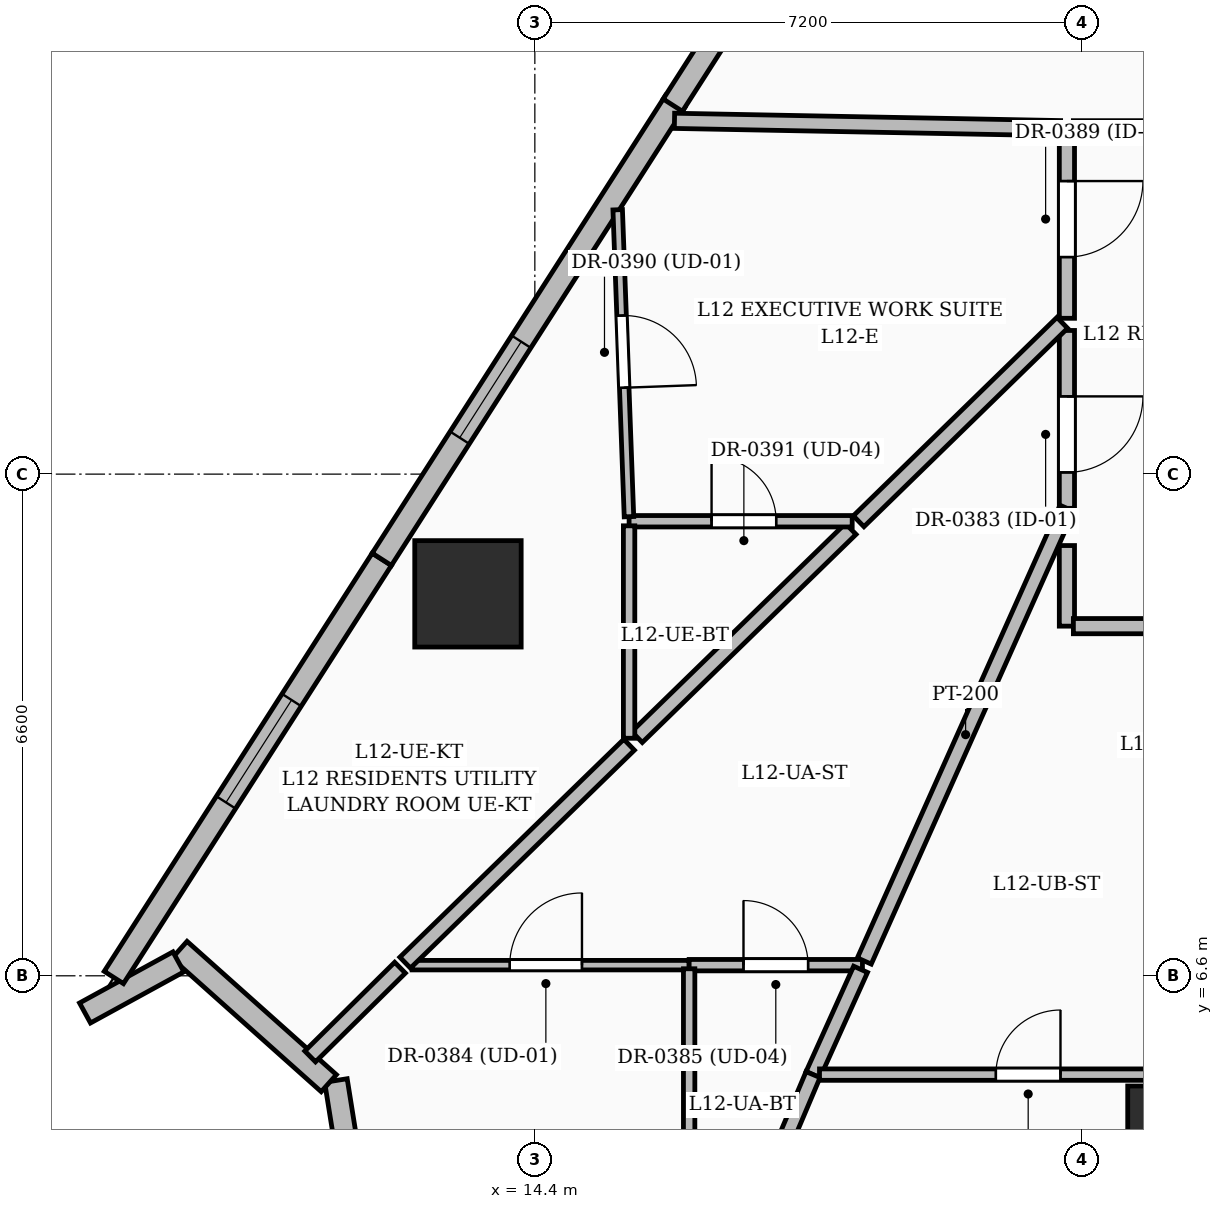
"""IFC4 building model, lengths in metres.
Left out: names, types, materials, properties, quantities, classifications, styles, units other than length and angle.
Written with IfcOpenShell. Run it as: python <this file> out.ifc"""

import sys

from ifc_helpers import new_model, si_unit, direction, frame, frame_2d, origin, origin_2d, place, context, subcontext, project, spatial, rectangle, extrude, element, fill, save


model = new_model("IFC4")
c1 = context("Model", 3, precision=1e-05, world=origin(), true_north=direction((0.0, 1.0)))
c2 = subcontext(c1, "Body", "Model", "MODEL_VIEW")
j1 = project(units=[si_unit("LENGTHUNIT", "METRE"), si_unit("PLANEANGLEUNIT", "RADIAN")], contexts=[c1])
p1 = place(None, origin())
s1 = spatial("IfcSite", under=j1, at=p1, CompositionType="ELEMENT")
p2 = place(p1, origin())
s2 = spatial("IfcBuilding", under=s1, at=p2, CompositionType="ELEMENT")
p3 = place(p2, frame((0.0, 0.0, 53.4)))
s3 = spatial("IfcBuildingStorey", under=s2, at=p3, CompositionType="ELEMENT", Elevation=53.4)
p4 = place(p3, frame((22.8, 4.55, 0.0), z_axis=(0.0, 0.0, 1.0), x_axis=(1.0, 0.0, 0.0)))
e1 = element("IfcColumn", 1, at=p4, inside=s3, PredefinedType="COLUMN", context=c2, shape_type="SweptSolid", body=[
    extrude(rectangle(XDim=1.2, YDim=1.2, at=origin_2d()), origin(), (0.0, 0.0, 1.0), 3.6),
])
p5 = place(p3, frame((13.52, 11.625, 0.0), z_axis=(0.0, 0.0, 1.0), x_axis=(1.0, 0.0, 0.0)))
e2 = element("IfcColumn", 2, at=p5, inside=s3, PredefinedType="COLUMN", context=c2, shape_type="SweptSolid", body=[
    extrude(rectangle(XDim=1.4, YDim=1.4, at=origin_2d()), origin(), (0.0, 0.0, 1.0), 3.6),
])
p6 = place(p3, frame((12.203, 2.602, 0.0), z_axis=(0.0, 0.0, 1.0), x_axis=(-0.158173523246, 0.987411330978, 0.0)))
e3 = element("IfcWall", 3, at=p6, inside=s3, PredefinedType="SOLIDWALL", context=c2, shape_type="SweptSolid", body=[
    extrude(rectangle(XDim=2.653, YDim=0.3, at=frame_2d((1.327, 0.0))), origin(), (0.0, 0.0, 1.0), 3.35),
])
p7 = place(p6, frame((0.325, 0.0, 0.55)))
e4 = element("IfcOpeningElement", 4, at=p7, cuts=e3, PredefinedType="OPENING", context=c2, shape_type="SweptSolid", body=[
    extrude(rectangle(XDim=1.6, YDim=2.2, at=frame_2d((0.8, 1.1))), frame((0.0, 0.16, 0.0), z_axis=(0.0, -1.0, 0.0), x_axis=(1.0, 0.0, 0.0)), (0.0, 0.0, 1.0), 0.32),
])
p8 = place(p3, frame((11.689, 5.187, 0.0), z_axis=(0.0, 0.0, 1.0), x_axis=(-0.745975491387, 0.665973397555, 0.0)))
e5 = element("IfcWall", 5, at=p8, inside=s3, PredefinedType="SOLIDWALL", context=c2, shape_type="SweptSolid", body=[
    extrude(rectangle(XDim=2.634, YDim=0.3, at=frame_2d((1.317, 0.0))), origin(), (0.0, 0.0, 1.0), 3.35),
])
p9 = place(p3, frame((9.711, 6.783, 0.0), z_axis=(0.0, 0.0, 1.0), x_axis=(-0.877215145436, -0.480097478245, 0.0)))
e6 = element("IfcWall", 6, at=p9, inside=s3, PredefinedType="SOLIDWALL", context=c2, shape_type="SweptSolid", body=[
    extrude(rectangle(XDim=1.4, YDim=0.3, at=frame_2d((0.7, 0.0))), origin(), (0.0, 0.0, 1.0), 3.35),
])
p10 = place(p3, frame((8.861, 6.578, 0.0), z_axis=(0.0, 0.0, 1.0), x_axis=(0.539510604495, 0.841978804744, 0.0)))
e7 = element("IfcWall", 7, at=p10, inside=s3, PredefinedType="SOLIDWALL", context=c2, shape_type="SweptSolid", body=[
    extrude(rectangle(XDim=6.534, YDim=0.3, at=frame_2d((3.267, 0.0))), origin(), (0.0, 0.0, 1.0), 3.35),
])
p11 = place(p10, frame((2.735, 0.0, 0.55)))
e8 = element("IfcOpeningElement", 8, at=p11, cuts=e7, PredefinedType="OPENING", context=c2, shape_type="SweptSolid", body=[
    extrude(rectangle(XDim=1.6, YDim=2.2, at=frame_2d((0.8, 1.1))), frame((0.0, 0.16, 0.0), z_axis=(0.0, -1.0, 0.0), x_axis=(1.0, 0.0, 0.0)), (0.0, 0.0, 1.0), 0.32),
])
p12 = place(p3, frame((12.386, 12.079, 0.0), z_axis=(0.0, 0.0, 1.0), x_axis=(0.539509086386, 0.841979777493, 0.0)))
e9 = element("IfcWall", 9, at=p12, inside=s3, PredefinedType="SOLIDWALL", context=c2, shape_type="SweptSolid", body=[
    extrude(rectangle(XDim=7.149, YDim=0.3, at=frame_2d((3.574, 0.0))), origin(), (0.0, 0.0, 1.0), 3.35),
])
p13 = place(p12, frame((1.9, 0.0, 0.6)))
e10 = element("IfcOpeningElement", 10, at=p13, cuts=e9, PredefinedType="OPENING", context=c2, shape_type="SweptSolid", body=[
    extrude(rectangle(XDim=1.5, YDim=2.1, at=frame_2d((0.75, 1.05))), frame((0.0, 0.16, 0.0), z_axis=(0.0, -1.0, 0.0), x_axis=(1.0, 0.0, 0.0)), (0.0, 0.0, 1.0), 0.32),
])
p14 = place(p3, frame((16.215, 18.054, 0.0), z_axis=(0.0, 0.0, 1.0), x_axis=(0.539527015547, 0.841968288889, 0.0)))
e11 = element("IfcWall", 11, at=p14, inside=s3, PredefinedType="SOLIDWALL", context=c2, shape_type="SweptSolid", body=[
    extrude(rectangle(XDim=6.922, YDim=0.3, at=frame_2d((3.461, 0.0))), origin(), (0.0, 0.0, 1.0), 3.35),
])
p15 = place(p14, frame((2.978, 0.0, 0.8)))
e12 = element("IfcOpeningElement", 12, at=p15, cuts=e11, PredefinedType="OPENING", context=c2, shape_type="SweptSolid", body=[
    extrude(rectangle(XDim=1.2, YDim=1.8, at=frame_2d((0.6, 0.9))), frame((0.0, 0.16, 0.0), z_axis=(0.0, -1.0, 0.0), x_axis=(1.0, 0.0, 0.0)), (0.0, 0.0, 1.0), 0.32),
])
p16 = place(p3, frame((21.4, 15.09, 0.0), z_axis=(0.0, 0.0, 1.0), x_axis=(0.0, -1.0, 0.0)))
e13 = element("IfcWall", 13, at=p16, inside=s3, PredefinedType="PARTITIONING", context=c2, shape_type="SweptSolid", body=[
    extrude(rectangle(XDim=2.34, YDim=0.2, at=frame_2d((1.17, 0.0))), origin(), (0.0, 0.0, 1.0), 3.01),
])
p17 = place(p16, frame((0.867, 0.0, 0.0)))
e14 = element("IfcOpeningElement", 14, at=p17, cuts=e13, PredefinedType="OPENING", context=c2, shape_type="SweptSolid", body=[
    extrude(rectangle(XDim=1.0, YDim=2.2, at=frame_2d((0.5, 1.1))), frame((0.0, 0.11, 0.0), z_axis=(0.0, -1.0, 0.0), x_axis=(1.0, 0.0, 0.0)), (0.0, 0.0, 1.0), 0.22),
])
p18 = place(p3, frame((21.4, 12.26, 0.0), z_axis=(0.0, 0.0, 1.0), x_axis=(0.0, -1.0, 0.0)))
e15 = element("IfcWall", 15, at=p18, inside=s3, PredefinedType="PARTITIONING", context=c2, shape_type="SweptSolid", body=[
    extrude(rectangle(XDim=1.061, YDim=0.2, at=frame_2d((0.53, 0.0))), origin(), (0.0, 0.0, 1.0), 3.35),
])
p19 = place(p3, frame((21.485, 11.2, 0.0), z_axis=(0.0, 0.0, 1.0), x_axis=(1.0, 0.0, 0.0)))
e16 = element("IfcWall", 16, at=p19, inside=s3, PredefinedType="PARTITIONING", context=c2, shape_type="SweptSolid", body=[
    extrude(rectangle(XDim=3.384, YDim=0.2, at=frame_2d((1.692, 0.0))), origin(), (0.0, 0.0, 1.0), 3.01),
])
p20 = place(p19, frame((1.25, 0.0, 0.0)))
e17 = element("IfcOpeningElement", 17, at=p20, cuts=e16, PredefinedType="OPENING", context=c2, shape_type="SweptSolid", body=[
    extrude(rectangle(XDim=1.0, YDim=2.2, at=frame_2d((0.5, 1.1))), frame((0.0, 0.11, 0.0), z_axis=(0.0, -1.0, 0.0), x_axis=(1.0, 0.0, 0.0)), (0.0, 0.0, 1.0), 0.22),
])
p21 = place(p3, frame((21.4, 17.75, 0.0), z_axis=(0.0, 0.0, 1.0), x_axis=(0.0, -1.0, 0.0)))
e18 = element("IfcWall", 18, at=p21, inside=s3, PredefinedType="PARTITIONING", context=c2, shape_type="SweptSolid", body=[
    extrude(rectangle(XDim=2.5, YDim=0.2, at=frame_2d((1.25, 0.0))), origin(), (0.0, 0.0, 1.0), 3.35),
])
p22 = place(p21, frame((0.695, 0.0, 0.0)))
e19 = element("IfcOpeningElement", 19, at=p22, cuts=e18, PredefinedType="OPENING", context=c2, shape_type="SweptSolid", body=[
    extrude(rectangle(XDim=1.0, YDim=2.2, at=frame_2d((0.5, 1.1))), frame((0.0, 0.11, 0.0), z_axis=(0.0, -1.0, 0.0), x_axis=(1.0, 0.0, 0.0)), (0.0, 0.0, 1.0), 0.22),
])
p23 = place(p3, frame((27.43, 17.75, 0.0), z_axis=(0.0, 0.0, 1.0), x_axis=(-1.0, 0.0, 0.0)))
e20 = element("IfcWall", 20, at=p23, inside=s3, PredefinedType="PARTITIONING", context=c2, shape_type="SweptSolid", body=[
    extrude(rectangle(XDim=5.945, YDim=0.2, at=frame_2d((2.972, 0.0))), origin(), (0.0, 0.0, 1.0), 2.279),
])
p24 = place(p23, frame((2.506, 0.0, 0.0)))
e21 = element("IfcOpeningElement", 21, at=p24, cuts=e20, PredefinedType="OPENING", context=c2, shape_type="SweptSolid", body=[
    extrude(rectangle(XDim=0.9, YDim=2.1, at=frame_2d((0.45, 1.05))), frame((0.0, 0.11, 0.0), z_axis=(0.0, -1.0, 0.0), x_axis=(1.0, 0.0, 0.0)), (0.0, 0.0, 1.0), 0.22),
])
p25 = place(p3, frame((12.785, 6.74, 0.0), z_axis=(0.0, 0.0, 1.0), x_axis=(1.0, 0.0, 0.0)))
e22 = element("IfcWall", 22, at=p25, inside=s3, PredefinedType="PARTITIONING", context=c2, shape_type="SweptSolid", body=[
    extrude(rectangle(XDim=3.645, YDim=0.125, at=frame_2d((1.823, 0.0))), origin(), (0.0, 0.0, 1.0), 2.37),
])
p26 = place(p25, frame((1.285, 0.0, 0.0)))
e23 = element("IfcOpeningElement", 23, at=p26, cuts=e22, PredefinedType="OPENING", context=c2, shape_type="SweptSolid", body=[
    extrude(rectangle(XDim=0.95, YDim=2.2, at=frame_2d((0.475, 1.1))), frame((0.0, 0.072, 0.0), z_axis=(0.0, -1.0, 0.0), x_axis=(1.0, 0.0, 0.0)), (0.0, 0.0, 1.0), 0.145),
])
p27 = place(p3, frame((16.43, 6.74, 0.0), z_axis=(0.0, 0.0, 1.0), x_axis=(1.0, 0.0, 0.0)))
e24 = element("IfcWall", 24, at=p27, inside=s3, PredefinedType="PARTITIONING", context=c2, shape_type="SweptSolid", body=[
    extrude(rectangle(XDim=2.28, YDim=0.15, at=frame_2d((1.14, 0.0))), origin(), (0.0, 0.0, 1.0), 2.37),
])
p28 = place(p27, frame((0.715, 0.0, 0.0)))
e25 = element("IfcOpeningElement", 25, at=p28, cuts=e24, PredefinedType="OPENING", context=c2, shape_type="SweptSolid", body=[
    extrude(rectangle(XDim=0.85, YDim=2.1, at=frame_2d((0.425, 1.05))), frame((0.0, 0.085, 0.0), z_axis=(0.0, -1.0, 0.0), x_axis=(1.0, 0.0, 0.0)), (0.0, 0.0, 1.0), 0.17),
])
p29 = place(p3, frame((18.735, 6.795, 0.0), z_axis=(0.0, 0.0, 1.0), x_axis=(0.408515389568, 0.912751431928, 0.0)))
e26 = element("IfcWall", 26, at=p29, inside=s3, PredefinedType="PARTITIONING", context=c2, shape_type="SweptSolid", body=[
    extrude(rectangle(XDim=6.524, YDim=0.2, at=frame_2d((3.262, 0.0))), origin(), (0.0, 0.0, 1.0), 2.279),
])
p30 = place(p3, frame((21.339, 15.191, 0.0), z_axis=(0.0, 0.0, 1.0), x_axis=(-0.716217041319, -0.697877603684, 0.0)))
e27 = element("IfcWall", 27, at=p30, inside=s3, PredefinedType="PARTITIONING", context=c2, shape_type="SweptSolid", body=[
    extrude(rectangle(XDim=3.741, YDim=0.2, at=frame_2d((1.87, 0.0))), origin(), (0.0, 0.0, 1.0), 3.35),
])
p31 = place(p3, frame((18.556, 12.479, 0.0), z_axis=(0.0, 0.0, 1.0), x_axis=(-0.716529276708, -0.69755701962, 0.0)))
e28 = element("IfcWall", 28, at=p31, inside=s3, PredefinedType="PARTITIONING", context=c2, shape_type="SweptSolid", body=[
    extrude(rectangle(XDim=3.925, YDim=0.2, at=frame_2d((1.962, 0.0))), origin(), (0.0, 0.0, 1.0), 2.279),
])
p32 = place(p3, frame((15.64, 9.64, 0.0), z_axis=(0.0, 0.0, 1.0), x_axis=(-0.716663345688, -0.697419277728, 0.0)))
e29 = element("IfcWall", 29, at=p32, inside=s3, PredefinedType="PARTITIONING", context=c2, shape_type="SweptSolid", body=[
    extrude(rectangle(XDim=4.11, YDim=0.2, at=frame_2d((2.055, 0.0))), origin(), (0.0, 0.0, 1.0), 2.37),
])
p33 = place(p3, frame((16.43, 1.9, 0.0), z_axis=(0.0, 0.0, 1.0), x_axis=(0.0, 1.0, 0.0)))
e30 = element("IfcWall", 30, at=p33, inside=s3, PredefinedType="PARTITIONING", context=c2, shape_type="SweptSolid", body=[
    extrude(rectangle(XDim=4.792, YDim=0.15, at=frame_2d((2.396, 0.0))), origin(), (0.0, 0.0, 1.0), 2.37),
])
p34 = place(p3, frame((12.626, 6.707, 0.0), z_axis=(0.0, 0.0, 1.0), x_axis=(-0.711501350424, -0.702684728982, 0.0)))
e31 = element("IfcWall", 31, at=p34, inside=s3, PredefinedType="PARTITIONING", context=c2, shape_type="SweptSolid", body=[
    extrude(rectangle(XDim=1.661, YDim=0.2, at=frame_2d((0.831, 0.0))), origin(), (0.0, 0.0, 1.0), 3.35),
])
p35 = place(p3, frame((18.06, 5.3, 0.0), z_axis=(0.0, 0.0, 1.0), x_axis=(0.411393031605, 0.911458048155, 0.0)))
e32 = element("IfcWall", 32, at=p35, inside=s3, PredefinedType="PARTITIONING", context=c2, shape_type="SweptSolid", body=[
    extrude(rectangle(XDim=1.52, YDim=0.2, at=frame_2d((0.76, 0.0))), origin(), (0.0, 0.0, 1.0), 3.01),
])
p36 = place(p3, frame((16.627, 1.918, 0.0), z_axis=(0.0, 0.0, 1.0), x_axis=(0.390153809481, 0.920749697229, 0.0)))
e33 = element("IfcWall", 33, at=p36, inside=s3, PredefinedType="PARTITIONING", context=c2, shape_type="SweptSolid", body=[
    extrude(rectangle(XDim=3.673, YDim=0.2, at=frame_2d((1.836, 0.0))), origin(), (0.0, 0.0, 1.0), 2.37),
])
p37 = place(p3, frame((18.145, 5.3, 0.0), z_axis=(0.0, 0.0, 1.0), x_axis=(1.0, 0.0, 0.0)))
e34 = element("IfcWall", 34, at=p37, inside=s3, PredefinedType="PARTITIONING", context=c2, shape_type="SweptSolid", body=[
    extrude(rectangle(XDim=5.695, YDim=0.15, at=frame_2d((2.848, 0.0))), origin(), (0.0, 0.0, 1.0), 3.01),
])
p38 = place(p37, frame((2.32, 0.0, 0.0)))
e35 = element("IfcOpeningElement", 35, at=p38, cuts=e34, PredefinedType="OPENING", context=c2, shape_type="SweptSolid", body=[
    extrude(rectangle(XDim=0.85, YDim=2.1, at=frame_2d((0.425, 1.05))), frame((0.0, 0.085, 0.0), z_axis=(0.0, -1.0, 0.0), x_axis=(1.0, 0.0, 0.0)), (0.0, 0.0, 1.0), 0.17),
])
p39 = place(p3, frame((15.64, 12.58, 0.0), z_axis=(0.0, 0.0, 1.0), x_axis=(1.0, 0.0, 0.0)))
e36 = element("IfcWall", 36, at=p39, inside=s3, PredefinedType="PARTITIONING", context=c2, shape_type="SweptSolid", body=[
    extrude(rectangle(XDim=2.935, YDim=0.15, at=frame_2d((1.468, 0.0))), origin(), (0.0, 0.0, 1.0), 3.01),
])
p40 = place(p39, frame((1.085, 0.0, 0.0)))
e37 = element("IfcOpeningElement", 37, at=p40, cuts=e36, PredefinedType="OPENING", context=c2, shape_type="SweptSolid", body=[
    extrude(rectangle(XDim=0.85, YDim=2.1, at=frame_2d((0.425, 1.05))), frame((0.0, 0.085, 0.0), z_axis=(0.0, -1.0, 0.0), x_axis=(1.0, 0.0, 0.0)), (0.0, 0.0, 1.0), 0.17),
])
p41 = place(p3, frame((15.49, 16.678, 0.0), z_axis=(0.0, 0.0, 1.0), x_axis=(0.036674223431, -0.999327274388, 0.0)))
e38 = element("IfcWall", 38, at=p41, inside=s3, PredefinedType="PARTITIONING", context=c2, shape_type="SweptSolid", body=[
    extrude(rectangle(XDim=4.041, YDim=0.125, at=frame_2d((2.021, 0.0))), origin(), (0.0, 0.0, 1.0), 2.37),
])
p42 = place(p41, frame((1.393, 0.0, 0.0)))
e39 = element("IfcOpeningElement", 39, at=p42, cuts=e38, PredefinedType="OPENING", context=c2, shape_type="SweptSolid", body=[
    extrude(rectangle(XDim=0.95, YDim=2.2, at=frame_2d((0.475, 1.1))), frame((0.0, 0.072, 0.0), z_axis=(0.0, -1.0, 0.0), x_axis=(1.0, 0.0, 0.0)), (0.0, 0.0, 1.0), 0.145),
])
p43 = place(p3, frame((21.315, 17.751, 0.0), z_axis=(0.0, 0.0, 1.0), x_axis=(-0.999818800326, 0.019035926964, 0.0)))
e40 = element("IfcWall", 40, at=p43, inside=s3, PredefinedType="PARTITIONING", context=c2, shape_type="SweptSolid", body=[
    extrude(rectangle(XDim=5.079, YDim=0.2, at=frame_2d((2.54, 0.0))), origin(), (0.0, 0.0, 1.0), 2.37),
])
p44 = place(p3, frame((15.64, 12.52, 0.0), z_axis=(0.0, 0.0, 1.0), x_axis=(0.0, -1.0, 0.0)))
e41 = element("IfcWall", 41, at=p44, inside=s3, PredefinedType="PARTITIONING", context=c2, shape_type="SweptSolid", body=[
    extrude(rectangle(XDim=2.795, YDim=0.15, at=frame_2d((1.397, 0.0))), origin(), (0.0, 0.0, 1.0), 2.279),
])
p45 = place(p11, origin())
e42 = element("IfcWindow", 42, at=p45, inside=s3, PartitioningType="SINGLE_PANEL", PredefinedType="WINDOW", context=c2, shape_type="SweptSolid", body=[
    extrude(rectangle(XDim=1.6, YDim=2.2, at=frame_2d((0.8, 1.1))), frame((0.0, 0.03, 0.0), z_axis=(0.0, -1.0, 0.0), x_axis=(1.0, 0.0, 0.0)), (0.0, 0.0, 1.0), 0.06),
])
fill(e8, e42)
p46 = place(p13, origin())
e43 = element("IfcWindow", 43, at=p46, inside=s3, PartitioningType="SINGLE_PANEL", PredefinedType="WINDOW", context=c2, shape_type="SweptSolid", body=[
    extrude(rectangle(XDim=1.5, YDim=2.1, at=frame_2d((0.75, 1.05))), frame((0.0, 0.03, 0.0), z_axis=(0.0, -1.0, 0.0), x_axis=(1.0, 0.0, 0.0)), (0.0, 0.0, 1.0), 0.06),
])
fill(e10, e43)
p47 = place(p17, origin())
e44 = element("IfcDoor", 44, at=p47, inside=s3, OperationType="SINGLE_SWING_LEFT", PredefinedType="DOOR", context=c2, shape_type="SweptSolid", body=[
    extrude(rectangle(XDim=1.0, YDim=2.2, at=frame_2d((0.5, 1.1))), frame((0.0, 0.025, 0.0), z_axis=(0.0, -1.0, 0.0), x_axis=(1.0, 0.0, 0.0)), (0.0, 0.0, 1.0), 0.05),
])
fill(e14, e44)
p48 = place(p26, origin())
e45 = element("IfcDoor", 45, at=p48, inside=s3, OperationType="SINGLE_SWING_RIGHT", PredefinedType="DOOR", context=c2, shape_type="SweptSolid", body=[
    extrude(rectangle(XDim=0.95, YDim=2.2, at=frame_2d((0.475, 1.1))), frame((0.0, 0.025, 0.0), z_axis=(0.0, -1.0, 0.0), x_axis=(1.0, 0.0, 0.0)), (0.0, 0.0, 1.0), 0.05),
])
fill(e23, e45)
p49 = place(p28, origin())
e46 = element("IfcDoor", 46, at=p49, inside=s3, OperationType="SINGLE_SWING_LEFT", PredefinedType="DOOR", context=c2, shape_type="SweptSolid", body=[
    extrude(rectangle(XDim=0.85, YDim=2.1, at=frame_2d((0.425, 1.05))), frame((0.0, 0.025, 0.0), z_axis=(0.0, -1.0, 0.0), x_axis=(1.0, 0.0, 0.0)), (0.0, 0.0, 1.0), 0.05),
])
fill(e25, e46)
p50 = place(p38, origin())
e47 = element("IfcDoor", 47, at=p50, inside=s3, OperationType="SINGLE_SWING_RIGHT", PredefinedType="DOOR", context=c2, shape_type="SweptSolid", body=[
    extrude(rectangle(XDim=0.85, YDim=2.1, at=frame_2d((0.425, 1.05))), frame((0.0, 0.025, 0.0), z_axis=(0.0, -1.0, 0.0), x_axis=(1.0, 0.0, 0.0)), (0.0, 0.0, 1.0), 0.05),
])
fill(e35, e47)
p51 = place(p22, origin())
e48 = element("IfcDoor", 48, at=p51, inside=s3, OperationType="SINGLE_SWING_LEFT", PredefinedType="DOOR", context=c2, shape_type="SweptSolid", body=[
    extrude(rectangle(XDim=1.0, YDim=2.2, at=frame_2d((0.5, 1.1))), frame((0.0, 0.025, 0.0), z_axis=(0.0, -1.0, 0.0), x_axis=(1.0, 0.0, 0.0)), (0.0, 0.0, 1.0), 0.05),
])
fill(e19, e48)
p52 = place(p42, origin())
e49 = element("IfcDoor", 49, at=p52, inside=s3, OperationType="SINGLE_SWING_RIGHT", PredefinedType="DOOR", context=c2, shape_type="SweptSolid", body=[
    extrude(rectangle(XDim=0.95, YDim=2.2, at=frame_2d((0.475, 1.1))), frame((0.0, 0.025, 0.0), z_axis=(0.0, -1.0, 0.0), x_axis=(1.0, 0.0, 0.0)), (0.0, 0.0, 1.0), 0.05),
])
fill(e39, e49)
p53 = place(p40, origin())
e50 = element("IfcDoor", 50, at=p53, inside=s3, OperationType="SINGLE_SWING_LEFT", PredefinedType="DOOR", context=c2, shape_type="SweptSolid", body=[
    extrude(rectangle(XDim=0.85, YDim=2.1, at=frame_2d((0.425, 1.05))), frame((0.0, 0.025, 0.0), z_axis=(0.0, -1.0, 0.0), x_axis=(1.0, 0.0, 0.0)), (0.0, 0.0, 1.0), 0.05),
])
fill(e37, e50)
save(model, sys.argv[1])
